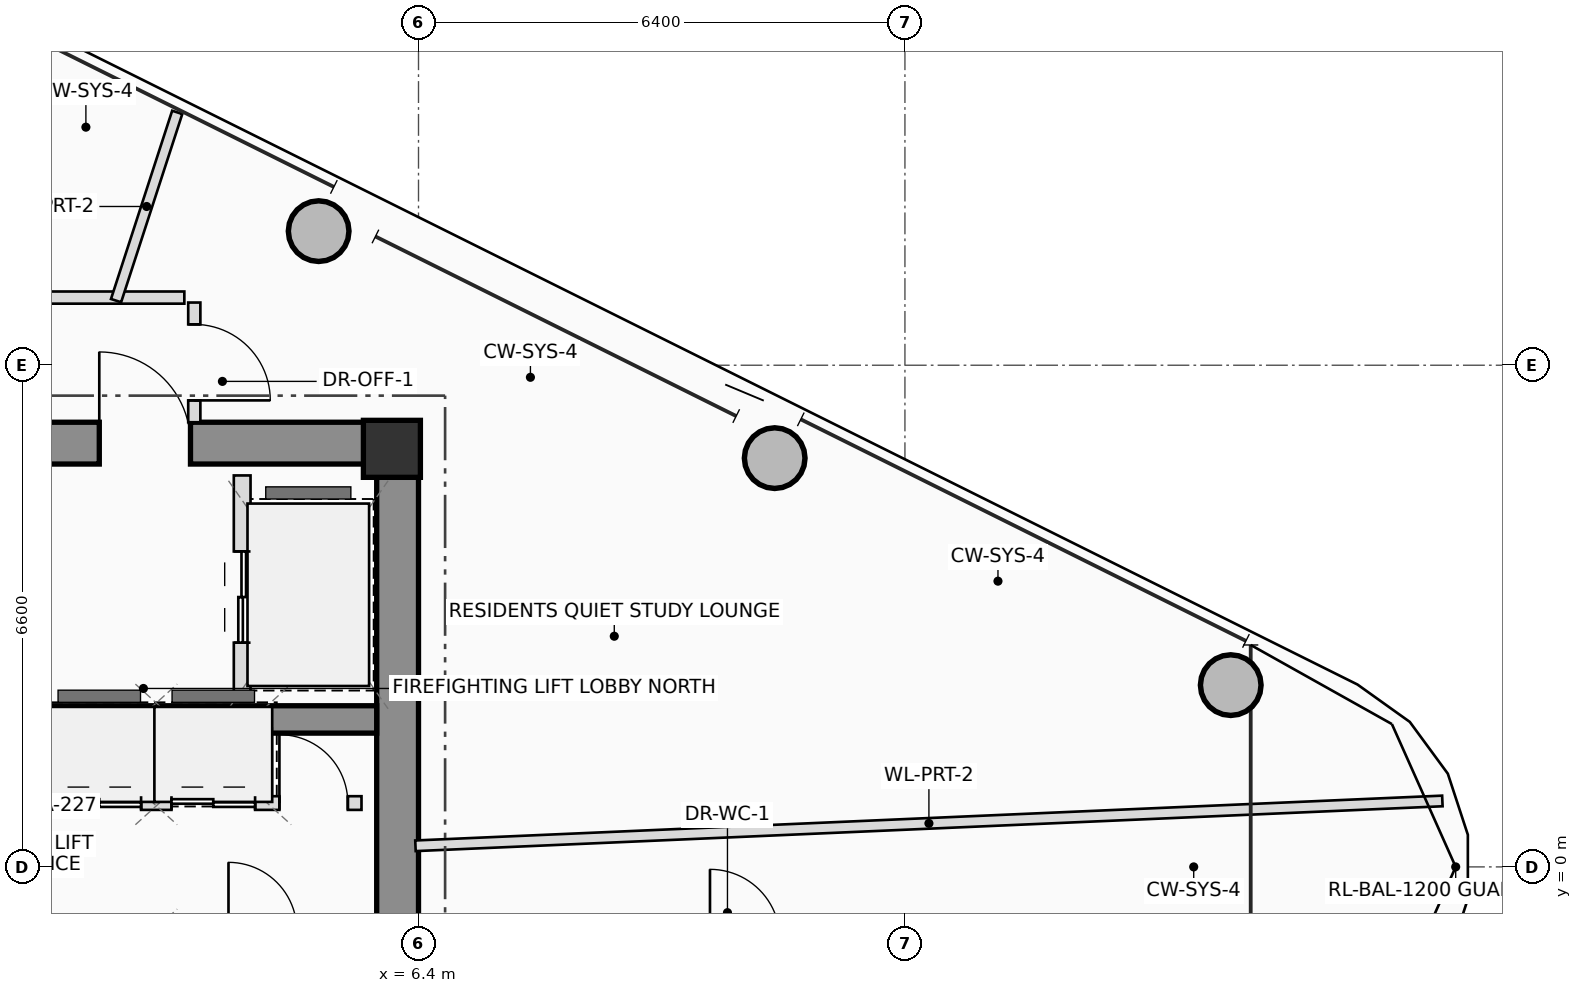
"""IFC4 building model, lengths in metres.
Left out: names, types, materials, properties, quantities, classifications, styles, units other than length and angle.
Written with IfcOpenShell. Run it as: python <this file> out.ifc"""

import sys

from ifc_helpers import new_model, si_unit, direction, frame, frame_2d, origin, origin_2d, place, context, subcontext, project, spatial, rectangle, hollow_circle, extrude, source, transform, mapped, element, fill, save


model = new_model("IFC4")
c1 = context("Model", 3, precision=1e-05, world=origin(), true_north=direction((0.0, 1.0)))
c2 = subcontext(c1, "Body", "Model", "MODEL_VIEW")
j1 = project(units=[si_unit("LENGTHUNIT", "METRE"), si_unit("PLANEANGLEUNIT", "RADIAN")], contexts=[c1])
p1 = place(None, origin())
s1 = spatial("IfcSite", under=j1, at=p1, CompositionType="ELEMENT")
p2 = place(p1, origin())
s2 = spatial("IfcBuilding", under=s1, at=p2, CompositionType="ELEMENT")
p3 = place(p2, frame((0.0, 0.0, 300.2)))
s3 = spatial("IfcBuildingStorey", under=s2, at=p3, CompositionType="ELEMENT", Elevation=300.2)
m1 = source(origin(), c2, "Body", "SweptSolid", [
    extrude(rectangle(XDim=0.75, YDim=0.75, at=origin_2d()), origin(), (0.0, 0.0, 1.0), 3.45),
])
p4 = place(p3, frame((6.05, 5.5, 0.0), z_axis=(0.0, 0.0, 1.0), x_axis=(1.0, 0.0, 0.0)))
e1 = element("IfcColumn", 1, at=p4, inside=s3, PredefinedType="COLUMN", context=c2, shape_type="MappedRepresentation", body=[
    mapped(m1, transform((0.0, 0.0, 0.0), scale=1.0)),
])
p5 = place(p3, frame((-6.4, 5.575, 0.0), z_axis=(0.0, 0.0, 1.0), x_axis=(1.0, 0.0, 0.0)))
e2 = element("IfcWall", 2, at=p5, inside=s3, PredefinedType="SHEAR", context=c2, shape_type="SweptSolid", body=[
    extrude(rectangle(XDim=12.8, YDim=0.55, at=frame_2d((6.4, 0.0))), origin(), (0.0, 0.0, 1.0), 3.45),
])
p6 = place(p5, frame((8.6, 0.0, 0.0)))
e3 = element("IfcOpeningElement", 3, at=p6, cuts=e2, PredefinedType="OPENING", context=c2, shape_type="SweptSolid", body=[
    extrude(rectangle(XDim=1.2, YDim=2.2, at=frame_2d((0.6, 1.1))), frame((0.0, 0.285, 0.0), z_axis=(0.0, -1.0, 0.0), x_axis=(1.0, 0.0, 0.0)), (0.0, 0.0, 1.0), 0.57),
])
p7 = place(p3, frame((6.125, -5.3, 0.0), z_axis=(0.0, 0.0, 1.0), x_axis=(0.0, 1.0, 0.0)))
e4 = element("IfcWall", 4, at=p7, inside=s3, PredefinedType="SHEAR", context=c2, shape_type="SweptSolid", body=[
    extrude(rectangle(XDim=10.6, YDim=0.55, at=frame_2d((5.3, 0.0))), origin(), (0.0, 0.0, 1.0), 3.45),
])
p8 = place(p3, frame((-5.85, 1.94, 0.0), z_axis=(0.0, 0.0, 1.0), x_axis=(1.0, 0.0, 0.0)))
e5 = element("IfcWall", 5, at=p8, inside=s3, PredefinedType="SHEAR", context=c2, shape_type="SweptSolid", body=[
    extrude(rectangle(XDim=11.7, YDim=0.36, at=frame_2d((5.85, 0.0))), origin(), (0.0, 0.0, 1.0), 3.45),
])
m2 = source(origin(), c2, "Body", "SweptSolid", [
    extrude(hollow_circle(Radius=0.4, WallThickness=0.028, at=origin_2d()), origin(), (0.0, 0.0, 1.0), 3.45),
])
for number, where, z_axis, x_axis in (
    (6, (17.087, 2.392, 0.0), (0.0, 0.0, 1.0), (1.0, 0.0, 0.0)),
    (7, (11.086, 5.378, 0.0), (0.0, 0.0, 1.0), (1.0, 0.0, 0.0)),
    (8, (5.086, 8.364, 0.0), (0.0, 0.0, 1.0), (1.0, 0.0, 0.0)),
):
    element("IfcColumn", number, at=place(p3, frame(where, z_axis=z_axis, x_axis=x_axis)), inside=s3, PredefinedType="COLUMN", context=c2, shape_type="MappedRepresentation", body=[
        mapped(m2, transform((0.0, 0.0, 0.0), scale=1.0)),
    ])
p9 = place(p3, frame((4.08, 2.2, 0.0), z_axis=(0.0, 0.0, 1.0), x_axis=(0.0, 1.0, 0.0)))
e9 = element("IfcWall", 9, at=p9, inside=s3, PredefinedType="PLUMBINGWALL", context=c2, shape_type="SweptSolid", body=[
    extrude(rectangle(XDim=2.95, YDim=0.22, at=frame_2d((1.475, 0.0))), origin(), (0.0, 0.0, 1.0), 3.25),
])
p10 = place(p9, frame((0.75, 0.0, 0.0)))
e10 = element("IfcOpeningElement", 10, at=p10, cuts=e9, PredefinedType="OPENING", context=c2, shape_type="SweptSolid", body=[
    extrude(rectangle(XDim=1.2, YDim=2.25, at=frame_2d((0.6, 1.125))), frame((0.0, 0.12, 0.0), z_axis=(0.0, -1.0, 0.0), x_axis=(1.0, 0.0, 0.0)), (0.0, 0.0, 1.0), 0.24),
])
for number, where, z_axis, x_axis in (
    (11, (3.02, 0.84, 0.0), (0.0, 0.0, 1.0), (0.0, 1.0, 0.0)),
    (12, (4.38, 0.84, 0.0), (0.0, 0.0, 1.0), (0.0, 1.0, 0.0)),
):
    element("IfcWall", number, at=place(p3, frame(where, z_axis=z_axis, x_axis=x_axis)), inside=s3, PredefinedType="PLUMBINGWALL", context=c2, shape_type="SweptSolid", body=[
        extrude(rectangle(XDim=0.98, YDim=0.18, at=frame_2d((0.49, 0.0))), origin(), (0.0, 0.0, 1.0), 3.25),
    ])
p11 = place(p3, frame((-5.68, 0.84, 0.0), z_axis=(0.0, 0.0, 1.0), x_axis=(1.0, 0.0, 0.0)))
e13 = element("IfcWall", 13, at=p11, inside=s3, PredefinedType="PLUMBINGWALL", context=c2, shape_type="SweptSolid", body=[
    extrude(rectangle(XDim=11.33, YDim=0.18, at=frame_2d((5.665, 0.0))), origin(), (0.0, 0.0, 1.0), 3.25),
])
p12 = place(p11, frame((3.13, 0.0, 0.0)))
e14 = element("IfcOpeningElement", 14, at=p12, cuts=e13, PredefinedType="OPENING", context=c2, shape_type="SweptSolid", body=[
    extrude(rectangle(XDim=0.9, YDim=2.05, at=frame_2d((0.45, 1.025))), frame((0.0, 0.1, 0.0), z_axis=(0.0, -1.0, 0.0), x_axis=(1.0, 0.0, 0.0)), (0.0, 0.0, 1.0), 0.2),
])
p13 = place(p11, frame((7.33, 0.0, 0.0)))
e15 = element("IfcOpeningElement", 15, at=p13, cuts=e13, PredefinedType="OPENING", context=c2, shape_type="SweptSolid", body=[
    extrude(rectangle(XDim=1.1, YDim=2.2, at=frame_2d((0.55, 1.1))), frame((0.0, 0.1, 0.0), z_axis=(0.0, -1.0, 0.0), x_axis=(1.0, 0.0, 0.0)), (0.0, 0.0, 1.0), 0.2),
])
p14 = place(p11, frame((8.83, 0.0, 0.0)))
e16 = element("IfcOpeningElement", 16, at=p14, cuts=e13, PredefinedType="OPENING", context=c2, shape_type="SweptSolid", body=[
    extrude(rectangle(XDim=1.1, YDim=2.2, at=frame_2d((0.55, 1.1))), frame((0.0, 0.1, 0.0), z_axis=(0.0, -1.0, 0.0), x_axis=(1.0, 0.0, 0.0)), (0.0, 0.0, 1.0), 0.2),
])
p15 = place(p11, frame((10.25, 0.0, 0.0)))
e17 = element("IfcOpeningElement", 17, at=p15, cuts=e13, PredefinedType="OPENING", context=c2, shape_type="SweptSolid", body=[
    extrude(rectangle(XDim=0.9, YDim=2.05, at=frame_2d((0.45, 1.025))), frame((0.0, 0.1, 0.0), z_axis=(0.0, -1.0, 0.0), x_axis=(1.0, 0.0, 0.0)), (0.0, 0.0, 1.0), 0.2),
])
p16 = place(p3, frame((-6.36, 7.49, 0.0), z_axis=(0.0, 0.0, 1.0), x_axis=(1.0, 0.0, 0.0)))
e18 = element("IfcWall", 18, at=p16, inside=s3, PredefinedType="PARTITIONING", context=c2, shape_type="SweptSolid", body=[
    extrude(rectangle(XDim=9.679, YDim=0.16, at=frame_2d((4.84, 0.0))), origin(), (0.0, 0.0, 1.0), 2.655),
])
p17 = place(p3, frame((3.45, 7.425, 0.0), z_axis=(0.0, 0.0, 1.0), x_axis=(0.0, -1.0, 0.0)))
e19 = element("IfcWall", 19, at=p17, inside=s3, PredefinedType="PARTITIONING", context=c2, shape_type="SweptSolid", body=[
    extrude(rectangle(XDim=1.575, YDim=0.16, at=frame_2d((0.787, 0.0))), origin(), (0.0, 0.0, 1.0), 2.855),
])
p18 = place(p17, frame((0.287, 0.0, 0.0)))
e20 = element("IfcOpeningElement", 20, at=p18, cuts=e19, PredefinedType="OPENING", context=c2, shape_type="SweptSolid", body=[
    extrude(rectangle(XDim=1.0, YDim=2.25, at=frame_2d((0.5, 1.125))), frame((0.0, 0.09, 0.0), z_axis=(0.0, -1.0, 0.0), x_axis=(1.0, 0.0, 0.0)), (0.0, 0.0, 1.0), 0.18),
])
p19 = place(p3, frame((6.36, 0.278, 0.0), z_axis=(0.0, 0.0, 1.0), x_axis=(0.999047623791, 0.043633076864, 0.0)))
e21 = element("IfcWall", 21, at=p19, inside=s3, PredefinedType="PARTITIONING", context=c2, shape_type="SweptSolid", body=[
    extrude(rectangle(XDim=13.524, YDim=0.14, at=frame_2d((6.762, 0.0))), origin(), (0.0, 0.0, 1.0), 2.815),
])
p20 = place(p3, frame((2.421, 7.45, 0.0), z_axis=(0.0, 0.0, 1.0), x_axis=(0.309047920595, 0.951046467201, 0.0)))
e22 = element("IfcWall", 22, at=p20, inside=s3, PredefinedType="PARTITIONING", context=c2, shape_type="SweptSolid", body=[
    extrude(rectangle(XDim=2.604, YDim=0.14, at=frame_2d((1.302, 0.0))), origin(), (0.0, 0.0, 1.0), 2.815),
])
p21 = place(p6, origin())
e23 = element("IfcDoor", 23, at=p21, inside=s3, OperationType="SINGLE_SWING_LEFT", PredefinedType="DOOR", context=c2, shape_type="SweptSolid", body=[
    extrude(rectangle(XDim=1.2, YDim=2.2, at=frame_2d((0.6, 1.1))), frame((0.0, 0.025, 0.0), z_axis=(0.0, -1.0, 0.0), x_axis=(1.0, 0.0, 0.0)), (0.0, 0.0, 1.0), 0.05),
])
fill(e3, e23)
p22 = place(p10, origin())
e24 = element("IfcDoor", 24, at=p22, inside=s3, OperationType="DOUBLE_DOOR_SLIDING", PredefinedType="DOOR", context=c2, shape_type="SweptSolid", body=[
    extrude(rectangle(XDim=1.2, YDim=2.25, at=frame_2d((0.6, 1.125))), frame((0.0, 0.025, 0.0), z_axis=(0.0, -1.0, 0.0), x_axis=(1.0, 0.0, 0.0)), (0.0, 0.0, 1.0), 0.05),
])
fill(e10, e24)
p23 = place(p13, origin())
e25 = element("IfcDoor", 25, at=p23, inside=s3, OperationType="DOUBLE_DOOR_SLIDING", PredefinedType="DOOR", context=c2, shape_type="SweptSolid", body=[
    extrude(rectangle(XDim=1.1, YDim=2.2, at=frame_2d((0.55, 1.1))), frame((0.0, 0.025, 0.0), z_axis=(0.0, -1.0, 0.0), x_axis=(1.0, 0.0, 0.0)), (0.0, 0.0, 1.0), 0.05),
])
fill(e15, e25)
p24 = place(p14, origin())
e26 = element("IfcDoor", 26, at=p24, inside=s3, OperationType="DOUBLE_DOOR_SLIDING", PredefinedType="DOOR", context=c2, shape_type="SweptSolid", body=[
    extrude(rectangle(XDim=1.1, YDim=2.2, at=frame_2d((0.55, 1.1))), frame((0.0, 0.025, 0.0), z_axis=(0.0, -1.0, 0.0), x_axis=(1.0, 0.0, 0.0)), (0.0, 0.0, 1.0), 0.05),
])
fill(e16, e26)
p25 = place(p15, origin())
e27 = element("IfcDoor", 27, at=p25, inside=s3, OperationType="SINGLE_SWING_LEFT", PredefinedType="DOOR", context=c2, shape_type="SweptSolid", body=[
    extrude(rectangle(XDim=0.9, YDim=2.05, at=frame_2d((0.45, 1.025))), frame((0.0, 0.025, 0.0), z_axis=(0.0, -1.0, 0.0), x_axis=(1.0, 0.0, 0.0)), (0.0, 0.0, 1.0), 0.05),
])
fill(e17, e27)
p26 = place(p18, origin())
e28 = element("IfcDoor", 28, at=p26, inside=s3, OperationType="SINGLE_SWING_RIGHT", PredefinedType="DOOR", context=c2, shape_type="SweptSolid", body=[
    extrude(rectangle(XDim=1.0, YDim=2.25, at=frame_2d((0.5, 1.125))), frame((0.0, 0.025, 0.0), z_axis=(0.0, -1.0, 0.0), x_axis=(1.0, 0.0, 0.0)), (0.0, 0.0, 1.0), 0.05),
])
fill(e20, e28)
save(model, sys.argv[1])
